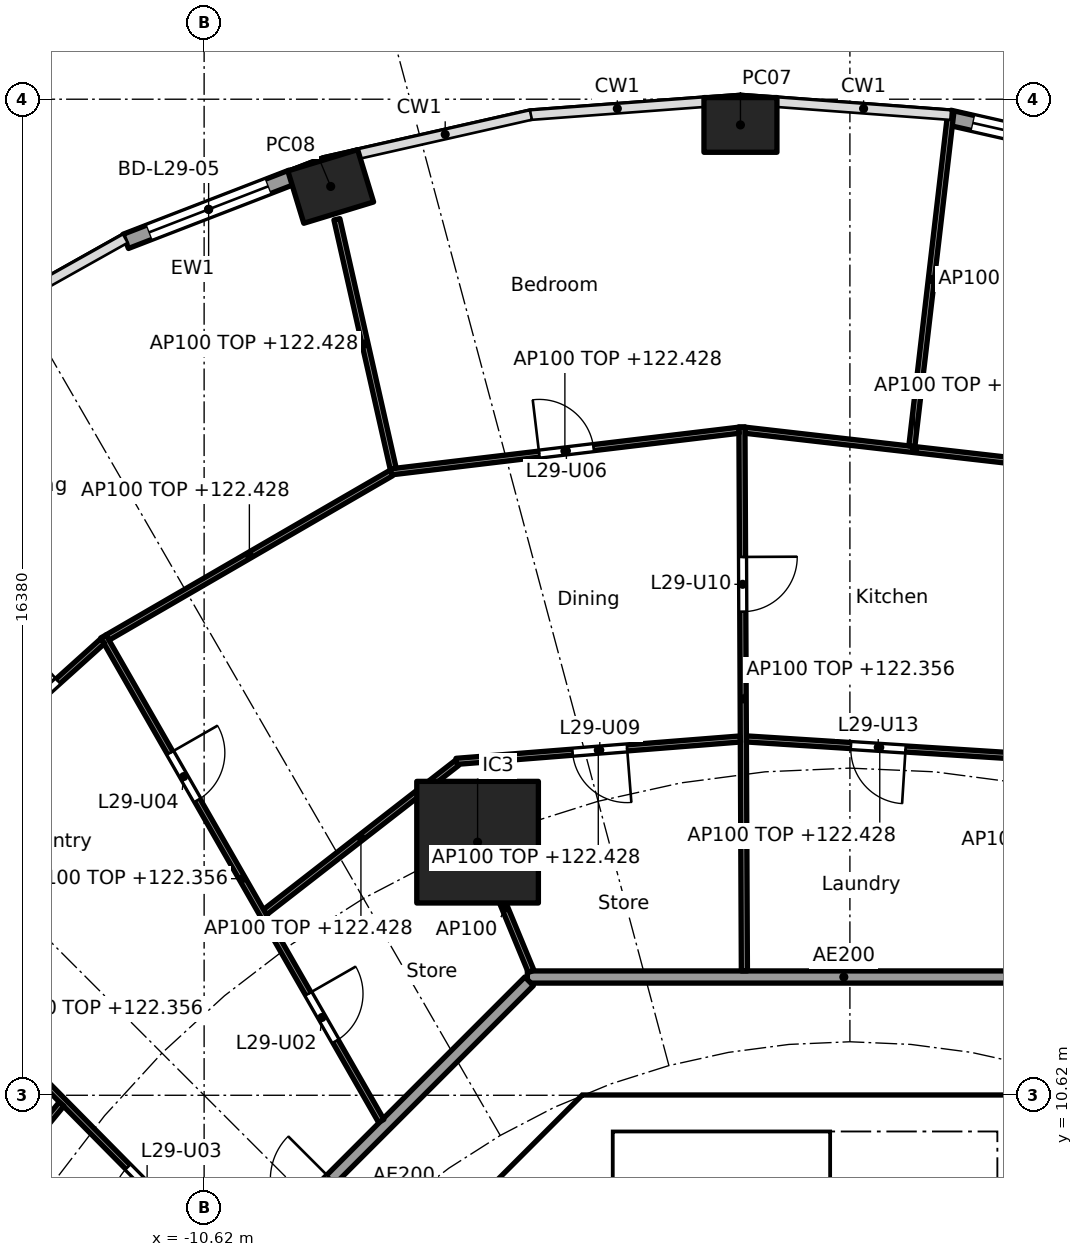
"""IFC4 building model, lengths in metres.
Left out: names, types, materials, properties, quantities, classifications, styles, units other than length and angle.
Written with IfcOpenShell. Run it as: python <this file> out.ifc"""

import sys

from ifc_helpers import new_model, si_unit, direction, frame, frame_2d, origin, origin_2d, place, context, subcontext, project, spatial, polyline, rectangle, hollow_rectangle, outline, extrude, element, fill, save


model = new_model("IFC4")
c1 = context("Model", 3, precision=1e-05, world=origin(), true_north=direction((0.0, 1.0)))
c2 = subcontext(c1, "Body", "Model", "MODEL_VIEW")
j1 = project(units=[si_unit("LENGTHUNIT", "METRE"), si_unit("PLANEANGLEUNIT", "RADIAN")], contexts=[c1])
p1 = place(None, origin())
s1 = spatial("IfcSite", under=j1, at=p1, CompositionType="ELEMENT")
p2 = place(p1, origin())
s2 = spatial("IfcBuilding", under=s1, at=p2, CompositionType="ELEMENT")
p3 = place(p2, frame((0.0, 0.0, 119.6)))
s3 = spatial("IfcBuildingStorey", under=s2, at=p3, CompositionType="ELEMENT", Elevation=119.6)
for number, where, z_axis, x_axis in (
    (1, (-1.8, 26.577, -0.26), (0.0, 0.0, 1.0), (-1.0, 0.0, 0.0)),
    (2, (-8.538, 25.565, -0.26), (0.0, 0.0, 1.0), (-0.957, -0.292, 0.0)),
):
    element("IfcColumn", number, at=place(p3, frame(where, z_axis=z_axis, x_axis=x_axis)), inside=s3, PredefinedType="COLUMN", context=c2, shape_type="SweptSolid", body=[
        extrude(hollow_rectangle(XDim=1.2, YDim=0.9, WallThickness=0.04, at=origin_2d()), origin(), (0.0, 0.0, 1.0), 3.96),
    ])
p4 = place(p3, frame((-6.123, 14.782, 0.0), z_axis=(0.0, 0.0, 1.0), x_axis=(1.0, 0.0, 0.0)))
e3 = element("IfcColumn", 3, at=p4, inside=s3, PredefinedType="COLUMN", context=c2, shape_type="SweptSolid", body=[
    extrude(rectangle(XDim=2.0, YDim=2.0, at=origin_2d()), origin(), (0.0, 0.0, 1.0), 3.7),
])
p5 = place(p3, frame((1.636, 26.697, 0.0), z_axis=(0.0, 0.0, 1.0), x_axis=(0.975339035722, -0.220711951186, 0.0)))
e4 = element("IfcWall", 4, at=p5, inside=s3, PredefinedType="SOLIDWALL", context=c2, shape_type="SweptSolid", body=[
    extrude(rectangle(XDim=2.89, YDim=0.25, at=frame_2d((1.445, 0.0))), origin(), (0.0, 0.0, 1.0), 3.44),
])
p6 = place(p5, frame((0.395, 0.0, 0.0)))
e5 = element("IfcOpeningElement", 5, at=p6, cuts=e4, PredefinedType="OPENING", context=c2, shape_type="SweptSolid", body=[
    extrude(rectangle(XDim=2.1, YDim=2.4, at=frame_2d((1.05, 1.2))), frame((0.0, 0.135, 0.0), z_axis=(0.0, -1.0, 0.0), x_axis=(1.0, 0.0, 0.0)), (0.0, 0.0, 1.0), 0.27),
])
p7 = place(p3, frame((-11.909, 24.662, 0.0), z_axis=(0.0, 0.0, 1.0), x_axis=(0.932845344347, 0.360277064952, 0.0)))
e6 = element("IfcWall", 6, at=p7, inside=s3, PredefinedType="SOLIDWALL", context=c2, shape_type="SweptSolid", body=[
    extrude(rectangle(XDim=2.923, YDim=0.25, at=frame_2d((1.462, 0.0))), origin(), (0.0, 0.0, 1.0), 3.44),
])
p8 = place(p7, frame((0.412, 0.0, 0.0)))
e7 = element("IfcOpeningElement", 7, at=p8, cuts=e6, PredefinedType="OPENING", context=c2, shape_type="SweptSolid", body=[
    extrude(rectangle(XDim=2.1, YDim=2.4, at=frame_2d((1.05, 1.2))), frame((0.0, 0.135, 0.0), z_axis=(0.0, -1.0, 0.0), x_axis=(1.0, 0.0, 0.0)), (0.0, 0.0, 1.0), 0.27),
])
p9 = place(p3, frame((-4.613, 9.988, 0.0), z_axis=(0.0, 0.0, 1.0), x_axis=(-0.707106781187, -0.707106781187, 0.0)))
e8 = element("IfcWall", 8, at=p9, inside=s3, PredefinedType="SHEAR", context=c2, shape_type="SweptSolid", body=[
    extrude(rectangle(XDim=7.602, YDim=0.6, at=frame_2d((3.801, 0.0))), origin(), (0.0, 0.0, 1.0), 3.44),
])
p10 = place(p9, frame((0.351, 0.0, 0.0)))
e9 = element("IfcOpeningElement", 9, at=p10, cuts=e8, PredefinedType="OPENING", context=c2, shape_type="SweptSolid", body=[
    extrude(rectangle(XDim=1.1, YDim=2.1, at=frame_2d((0.55, 1.05))), frame((0.0, 0.31, 0.0), z_axis=(0.0, -1.0, 0.0), x_axis=(1.0, 0.0, 0.0)), (0.0, 0.0, 1.0), 0.62),
])
p11 = place(p3, origin())
e10 = element("IfcWall", 10, at=p11, inside=s3, PredefinedType="SHEAR", context=c2, shape_type="SweptSolid", body=[
    extrude(outline(polyline([(-4.152, 10.025), (-4.401, 9.776), (-4.825, 10.2), (-4.401, 10.625), (4.401, 10.625), (4.825, 10.2), (4.401, 9.776), (4.152, 10.025), (-4.152, 10.025)])), origin(), (0.0, 0.0, 1.0), 3.44),
])
p12 = place(p3, origin())
e11 = element("IfcWall", 11, at=p12, inside=s3, PredefinedType="SOLIDWALL", context=c2, shape_type="SweptSolid", body=[
    extrude(outline(polyline([(-3.9, 7.025), (-4.1, 7.025), (-4.1, 10.025), (-3.9, 10.025), (-3.9, 7.025)])), origin(), (0.0, 0.0, 1.0), 3.44),
])
p13 = place(p3, frame((5.104, 12.565, 0.0), z_axis=(0.0, 0.0, 1.0), x_axis=(-1.0, 0.0, 0.0)))
e12 = element("IfcWall", 12, at=p13, inside=s3, PredefinedType="PARTITIONING", context=c2, shape_type="SweptSolid", body=[
    extrude(rectangle(XDim=10.409, YDim=0.2, at=frame_2d((5.205, 0.0))), origin(), (0.0, 0.0, 1.0), 3.44),
])
p14 = place(p3, frame((-5.275, 12.494, 0.0), z_axis=(0.0, 0.0, 1.0), x_axis=(-0.707106781187, -0.707106781187, 0.0)))
e13 = element("IfcWall", 13, at=p14, inside=s3, PredefinedType="PARTITIONING", context=c2, shape_type="SweptSolid", body=[
    extrude(rectangle(XDim=10.209, YDim=0.2, at=frame_2d((5.104, 0.0))), origin(), (0.0, 0.0, 1.0), 3.44),
])
p15 = place(p14, frame((4.604, 0.0, 0.0)))
e14 = element("IfcOpeningElement", 14, at=p15, cuts=e13, PredefinedType="OPENING", context=c2, shape_type="SweptSolid", body=[
    extrude(rectangle(XDim=1.0, YDim=2.1, at=frame_2d((0.5, 1.05))), frame((0.0, 0.11, 0.0), z_axis=(0.0, -1.0, 0.0), x_axis=(1.0, 0.0, 0.0)), (0.0, 0.0, 1.0), 0.22),
])
p16 = place(p3, frame((2.685, 16.202, 0.0), z_axis=(0.0, 0.0, 1.0), x_axis=(-0.998000808042, 0.063201164138, 0.0)))
e15 = element("IfcWall", 15, at=p16, inside=s3, PredefinedType="PARTITIONING", context=c2, shape_type="SweptSolid", body=[
    extrude(rectangle(XDim=4.396, YDim=0.1, at=frame_2d((2.198, 0.0))), origin(), (0.0, 0.0, 1.0), 2.828),
])
p17 = place(p16, frame((1.773, 0.0, 0.0)))
e16 = element("IfcOpeningElement", 16, at=p17, cuts=e15, PredefinedType="OPENING", context=c2, shape_type="SweptSolid", body=[
    extrude(rectangle(XDim=0.9, YDim=2.1, at=frame_2d((0.45, 1.05))), frame((0.0, 0.06, 0.0), z_axis=(0.0, -1.0, 0.0), x_axis=(1.0, 0.0, 0.0)), (0.0, 0.0, 1.0), 0.12),
])
p18 = place(p3, frame((3.851, 20.919, 0.0), z_axis=(0.0, 0.0, 1.0), x_axis=(-0.993519908136, 0.11365822512, 0.0)))
e17 = element("IfcWall", 17, at=p18, inside=s3, PredefinedType="PARTITIONING", context=c2, shape_type="SweptSolid", body=[
    extrude(rectangle(XDim=5.613, YDim=0.1, at=frame_2d((2.806, 0.0))), origin(), (0.0, 0.0, 1.0), 2.828),
])
p19 = place(p3, frame((1.019, 21.293, 0.0), z_axis=(0.0, 0.0, 1.0), x_axis=(0.11589741608, 0.993261188684, 0.0)))
e18 = element("IfcWall", 18, at=p19, inside=s3, PredefinedType="PARTITIONING", context=c2, shape_type="SweptSolid", body=[
    extrude(rectangle(XDim=5.523, YDim=0.1, at=frame_2d((2.762, 0.0))), origin(), (0.0, 0.0, 1.0), 2.905),
])
p20 = place(p3, frame((-1.735, 12.665, 0.0), z_axis=(0.0, 0.0, 1.0), x_axis=(-0.004474716456, 0.999989988406, 0.0)))
e19 = element("IfcWall", 19, at=p20, inside=s3, PredefinedType="PARTITIONING", context=c2, shape_type="SweptSolid", body=[
    extrude(rectangle(XDim=8.948, YDim=0.1, at=frame_2d((4.474, 0.0))), origin(), (0.0, 0.0, 1.0), 2.756),
])
p21 = place(p20, frame((5.908, 0.0, 0.0)))
e20 = element("IfcOpeningElement", 20, at=p21, cuts=e19, PredefinedType="OPENING", context=c2, shape_type="SweptSolid", body=[
    extrude(rectangle(XDim=0.9, YDim=2.1, at=frame_2d((0.45, 1.05))), frame((0.0, 0.06, 0.0), z_axis=(0.0, -1.0, 0.0), x_axis=(1.0, 0.0, 0.0)), (0.0, 0.0, 1.0), 0.12),
])
p22 = place(p3, frame((-1.802, 16.479, 0.0), z_axis=(0.0, 0.0, 1.0), x_axis=(-0.996909003513, -0.078564869469, 0.0)))
e21 = element("IfcWall", 21, at=p22, inside=s3, PredefinedType="PARTITIONING", context=c2, shape_type="SweptSolid", body=[
    extrude(rectangle(XDim=4.686, YDim=0.1, at=frame_2d((2.343, 0.0))), origin(), (0.0, 0.0, 1.0), 2.828),
])
p23 = place(p22, frame((1.868, 0.0, 0.0)))
e22 = element("IfcOpeningElement", 22, at=p23, cuts=e21, PredefinedType="OPENING", context=c2, shape_type="SweptSolid", body=[
    extrude(rectangle(XDim=0.9, YDim=2.1, at=frame_2d((0.45, 1.05))), frame((0.0, 0.06, 0.0), z_axis=(0.0, -1.0, 0.0), x_axis=(1.0, 0.0, 0.0)), (0.0, 0.0, 1.0), 0.12),
])
p24 = place(p3, frame((-1.825, 21.557, 0.0), z_axis=(0.0, 0.0, 1.0), x_axis=(-0.992915657947, -0.118821278412, 0.0)))
e23 = element("IfcWall", 23, at=p24, inside=s3, PredefinedType="PARTITIONING", context=c2, shape_type="SweptSolid", body=[
    extrude(rectangle(XDim=5.765, YDim=0.1, at=frame_2d((2.883, 0.0))), origin(), (0.0, 0.0, 1.0), 2.828),
])
p25 = place(p24, frame((2.408, 0.0, 0.0)))
e24 = element("IfcOpeningElement", 24, at=p25, cuts=e23, PredefinedType="OPENING", context=c2, shape_type="SweptSolid", body=[
    extrude(rectangle(XDim=0.9, YDim=2.1, at=frame_2d((0.45, 1.05))), frame((0.0, 0.06, 0.0), z_axis=(0.0, -1.0, 0.0), x_axis=(1.0, 0.0, 0.0)), (0.0, 0.0, 1.0), 0.12),
])
p26 = place(p3, frame((-5.243, 12.657, 0.0), z_axis=(0.0, 0.0, 1.0), x_axis=(-0.382719158442, 0.923864733477, 0.0)))
e25 = element("IfcWall", 25, at=p26, inside=s3, PredefinedType="PARTITIONING", context=c2, shape_type="SweptSolid", body=[
    extrude(rectangle(XDim=2.25, YDim=0.1, at=frame_2d((1.125, 0.0))), origin(), (0.0, 0.0, 1.0), 3.44),
])
p27 = place(p3, frame((-6.463, 16.084, 0.0), z_axis=(0.0, 0.0, 1.0), x_axis=(-0.789457442969, -0.613805299538, 0.0)))
e26 = element("IfcWall", 26, at=p27, inside=s3, PredefinedType="PARTITIONING", context=c2, shape_type="SweptSolid", body=[
    extrude(rectangle(XDim=3.997, YDim=0.1, at=frame_2d((1.999, 0.0))), origin(), (0.0, 0.0, 1.0), 2.828),
])
p28 = place(p3, frame((-7.511, 20.927, 0.0), z_axis=(0.0, 0.0, 1.0), x_axis=(-0.220337559031, 0.975423682345, 0.0)))
e27 = element("IfcWall", 27, at=p28, inside=s3, PredefinedType="PARTITIONING", context=c2, shape_type="SweptSolid", body=[
    extrude(rectangle(XDim=4.202, YDim=0.1, at=frame_2d((2.101, 0.0))), origin(), (0.0, 0.0, 1.0), 2.828),
])
p29 = place(p3, frame((-7.543, 20.853, 0.0), z_axis=(0.0, 0.0, 1.0), x_axis=(-0.865086194899, -0.501623240485, 0.0)))
e28 = element("IfcWall", 28, at=p29, inside=s3, PredefinedType="PARTITIONING", context=c2, shape_type="SweptSolid", body=[
    extrude(rectangle(XDim=5.393, YDim=0.1, at=frame_2d((2.697, 0.0))), origin(), (0.0, 0.0, 1.0), 2.828),
])
p30 = place(p3, frame((-7.708, 10.198, 0.0), z_axis=(0.0, 0.0, 1.0), x_axis=(-0.497449462689, 0.867492957937, 0.0)))
e29 = element("IfcWall", 29, at=p30, inside=s3, PredefinedType="PARTITIONING", context=c2, shape_type="SweptSolid", body=[
    extrude(rectangle(XDim=9.185, YDim=0.1, at=frame_2d((4.592, 0.0))), origin(), (0.0, 0.0, 1.0), 2.756),
])
p31 = place(p30, frame((1.511, 0.0, 0.0)))
e30 = element("IfcOpeningElement", 30, at=p31, cuts=e29, PredefinedType="OPENING", context=c2, shape_type="SweptSolid", body=[
    extrude(rectangle(XDim=0.9, YDim=2.1, at=frame_2d((0.45, 1.05))), frame((0.0, 0.06, 0.0), z_axis=(0.0, -1.0, 0.0), x_axis=(1.0, 0.0, 0.0)), (0.0, 0.0, 1.0), 0.12),
])
p32 = place(p30, frame((6.078, 0.0, 0.0)))
e31 = element("IfcOpeningElement", 31, at=p32, cuts=e29, PredefinedType="OPENING", context=c2, shape_type="SweptSolid", body=[
    extrude(rectangle(XDim=0.9, YDim=2.1, at=frame_2d((0.45, 1.05))), frame((0.0, 0.06, 0.0), z_axis=(0.0, -1.0, 0.0), x_axis=(1.0, 0.0, 0.0)), (0.0, 0.0, 1.0), 0.12),
])
p33 = place(p3, frame((-12.289, 18.089, 0.0), z_axis=(0.0, 0.0, 1.0), x_axis=(-0.743146066164, -0.669129228435, 0.0)))
e32 = element("IfcWall", 32, at=p33, inside=s3, PredefinedType="PARTITIONING", context=c2, shape_type="SweptSolid", body=[
    extrude(rectangle(XDim=5.739, YDim=0.1, at=frame_2d((2.87, 0.0))), origin(), (0.0, 0.0, 1.0), 2.828),
])
p34 = place(p33, frame((0.985, 0.0, 0.0)))
e33 = element("IfcOpeningElement", 33, at=p34, cuts=e32, PredefinedType="OPENING", context=c2, shape_type="SweptSolid", body=[
    extrude(rectangle(XDim=0.9, YDim=2.1, at=frame_2d((0.45, 1.05))), frame((0.0, 0.06, 0.0), z_axis=(0.0, -1.0, 0.0), x_axis=(1.0, 0.0, 0.0)), (0.0, 0.0, 1.0), 0.12),
])
p35 = place(p3, frame((-10.182, 7.729, 0.0), z_axis=(0.0, 0.0, 1.0), x_axis=(-0.702927211734, 0.711261790766, 0.0)))
e34 = element("IfcWall", 34, at=p35, inside=s3, PredefinedType="PARTITIONING", context=c2, shape_type="SweptSolid", body=[
    extrude(rectangle(XDim=9.168, YDim=0.1, at=frame_2d((4.584, 0.0))), origin(), (0.0, 0.0, 1.0), 2.756),
])
p36 = place(p35, frame((1.507, 0.0, 0.0)))
e35 = element("IfcOpeningElement", 35, at=p36, cuts=e34, PredefinedType="OPENING", context=c2, shape_type="SweptSolid", body=[
    extrude(rectangle(XDim=0.9, YDim=2.1, at=frame_2d((0.45, 1.05))), frame((0.0, 0.06, 0.0), z_axis=(0.0, -1.0, 0.0), x_axis=(1.0, 0.0, 0.0)), (0.0, 0.0, 1.0), 0.12),
])
p37 = place(p35, frame((6.067, 0.0, 0.0)))
e36 = element("IfcOpeningElement", 36, at=p37, cuts=e34, PredefinedType="OPENING", context=c2, shape_type="SweptSolid", body=[
    extrude(rectangle(XDim=0.9, YDim=2.1, at=frame_2d((0.45, 1.05))), frame((0.0, 0.06, 0.0), z_axis=(0.0, -1.0, 0.0), x_axis=(1.0, 0.0, 0.0)), (0.0, 0.0, 1.0), 0.12),
])
p38 = place(p3, frame((-12.965, 10.475, 0.0), z_axis=(0.0, 0.0, 1.0), x_axis=(-0.634943961338, -0.772558195841, 0.0)))
e37 = element("IfcWall", 37, at=p38, inside=s3, PredefinedType="PARTITIONING", context=c2, shape_type="SweptSolid", body=[
    extrude(rectangle(XDim=4.632, YDim=0.1, at=frame_2d((2.316, 0.0))), origin(), (0.0, 0.0, 1.0), 2.828),
])
p39 = place(p6, origin())
e38 = element("IfcDoor", 38, at=p39, inside=s3, OperationType="SLIDING_TO_LEFT", PredefinedType="DOOR", context=c2, shape_type="SweptSolid", body=[
    extrude(rectangle(XDim=2.1, YDim=2.4, at=frame_2d((1.05, 1.2))), frame((0.0, 0.025, 0.0), z_axis=(0.0, -1.0, 0.0), x_axis=(1.0, 0.0, 0.0)), (0.0, 0.0, 1.0), 0.05),
])
fill(e5, e38)
p40 = place(p8, origin())
e39 = element("IfcDoor", 39, at=p40, inside=s3, OperationType="SLIDING_TO_LEFT", PredefinedType="DOOR", context=c2, shape_type="SweptSolid", body=[
    extrude(rectangle(XDim=2.1, YDim=2.4, at=frame_2d((1.05, 1.2))), frame((0.0, 0.025, 0.0), z_axis=(0.0, -1.0, 0.0), x_axis=(1.0, 0.0, 0.0)), (0.0, 0.0, 1.0), 0.05),
])
fill(e7, e39)
p41 = place(p10, origin())
e40 = element("IfcDoor", 40, at=p41, inside=s3, OperationType="SINGLE_SWING_RIGHT", PredefinedType="DOOR", context=c2, shape_type="SweptSolid", body=[
    extrude(rectangle(XDim=1.1, YDim=2.1, at=frame_2d((0.55, 1.05))), frame((0.0, 0.025, 0.0), z_axis=(0.0, -1.0, 0.0), x_axis=(1.0, 0.0, 0.0)), (0.0, 0.0, 1.0), 0.05),
])
fill(e9, e40)
p42 = place(p31, frame((0.9, 0.0, 0.0), x_axis=(-1.0, 0.0, 0.0)))
e41 = element("IfcDoor", 41, at=p42, inside=s3, OperationType="SINGLE_SWING_LEFT", PredefinedType="DOOR", context=c2, shape_type="SweptSolid", body=[
    extrude(rectangle(XDim=0.9, YDim=2.1, at=frame_2d((0.45, 1.05))), frame((0.0, 0.025, 0.0), z_axis=(0.0, -1.0, 0.0), x_axis=(1.0, 0.0, 0.0)), (0.0, 0.0, 1.0), 0.05),
])
fill(e30, e41)
p43 = place(p36, origin())
e42 = element("IfcDoor", 42, at=p43, inside=s3, OperationType="SINGLE_SWING_LEFT", PredefinedType="DOOR", context=c2, shape_type="SweptSolid", body=[
    extrude(rectangle(XDim=0.9, YDim=2.1, at=frame_2d((0.45, 1.05))), frame((0.0, 0.025, 0.0), z_axis=(0.0, -1.0, 0.0), x_axis=(1.0, 0.0, 0.0)), (0.0, 0.0, 1.0), 0.05),
])
fill(e35, e42)
p44 = place(p32, frame((0.9, 0.0, 0.0), x_axis=(-1.0, 0.0, 0.0)))
e43 = element("IfcDoor", 43, at=p44, inside=s3, OperationType="SINGLE_SWING_LEFT", PredefinedType="DOOR", context=c2, shape_type="SweptSolid", body=[
    extrude(rectangle(XDim=0.9, YDim=2.1, at=frame_2d((0.45, 1.05))), frame((0.0, 0.025, 0.0), z_axis=(0.0, -1.0, 0.0), x_axis=(1.0, 0.0, 0.0)), (0.0, 0.0, 1.0), 0.05),
])
fill(e31, e43)
p45 = place(p25, frame((0.9, 0.0, 0.0), x_axis=(-1.0, 0.0, 0.0)))
e44 = element("IfcDoor", 44, at=p45, inside=s3, OperationType="SINGLE_SWING_LEFT", PredefinedType="DOOR", context=c2, shape_type="SweptSolid", body=[
    extrude(rectangle(XDim=0.9, YDim=2.1, at=frame_2d((0.45, 1.05))), frame((0.0, 0.025, 0.0), z_axis=(0.0, -1.0, 0.0), x_axis=(1.0, 0.0, 0.0)), (0.0, 0.0, 1.0), 0.05),
])
fill(e24, e44)
p46 = place(p34, frame((0.9, 0.0, 0.0), x_axis=(-1.0, 0.0, 0.0)))
e45 = element("IfcDoor", 45, at=p46, inside=s3, OperationType="SINGLE_SWING_RIGHT", PredefinedType="DOOR", context=c2, shape_type="SweptSolid", body=[
    extrude(rectangle(XDim=0.9, YDim=2.1, at=frame_2d((0.45, 1.05))), frame((0.0, 0.025, 0.0), z_axis=(0.0, -1.0, 0.0), x_axis=(1.0, 0.0, 0.0)), (0.0, 0.0, 1.0), 0.05),
])
fill(e33, e45)
p47 = place(p23, origin())
e46 = element("IfcDoor", 46, at=p47, inside=s3, OperationType="SINGLE_SWING_LEFT", PredefinedType="DOOR", context=c2, shape_type="SweptSolid", body=[
    extrude(rectangle(XDim=0.9, YDim=2.1, at=frame_2d((0.45, 1.05))), frame((0.0, 0.025, 0.0), z_axis=(0.0, -1.0, 0.0), x_axis=(1.0, 0.0, 0.0)), (0.0, 0.0, 1.0), 0.05),
])
fill(e22, e46)
p48 = place(p21, frame((0.9, 0.0, 0.0), x_axis=(-1.0, 0.0, 0.0)))
e47 = element("IfcDoor", 47, at=p48, inside=s3, OperationType="SINGLE_SWING_LEFT", PredefinedType="DOOR", context=c2, shape_type="SweptSolid", body=[
    extrude(rectangle(XDim=0.9, YDim=2.1, at=frame_2d((0.45, 1.05))), frame((0.0, 0.025, 0.0), z_axis=(0.0, -1.0, 0.0), x_axis=(1.0, 0.0, 0.0)), (0.0, 0.0, 1.0), 0.05),
])
fill(e20, e47)
p49 = place(p17, origin())
e48 = element("IfcDoor", 48, at=p49, inside=s3, OperationType="SINGLE_SWING_LEFT", PredefinedType="DOOR", context=c2, shape_type="SweptSolid", body=[
    extrude(rectangle(XDim=0.9, YDim=2.1, at=frame_2d((0.45, 1.05))), frame((0.0, 0.025, 0.0), z_axis=(0.0, -1.0, 0.0), x_axis=(1.0, 0.0, 0.0)), (0.0, 0.0, 1.0), 0.05),
])
fill(e16, e48)
save(model, sys.argv[1])
